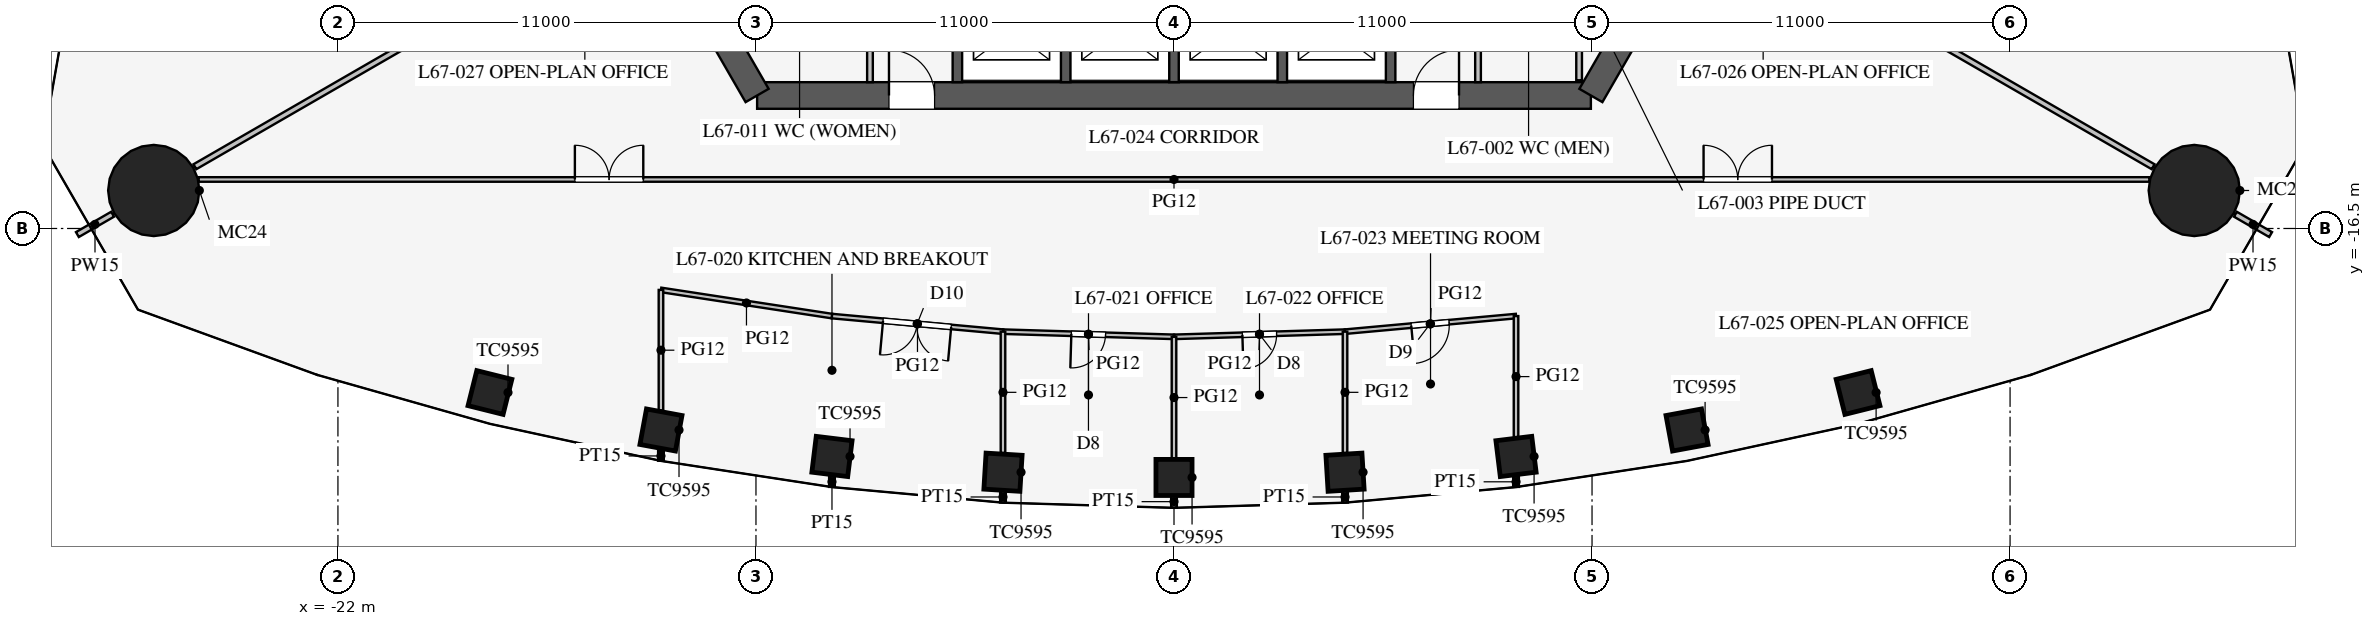
"""IFC4 building model, lengths in metres.
Left out: names, types, materials, properties, quantities, classifications, styles, units other than length and angle.
Written with IfcOpenShell. Run it as: python <this file> out.ifc"""

import sys

from ifc_helpers import new_model, si_unit, direction, frame, frame_2d, origin, origin_2d, place, context, subcontext, project, spatial, rectangle, circle, extrude, element, fill, save


model = new_model("IFC4")
c1 = context("Model", 3, precision=1e-05, world=origin(), true_north=direction((0.0, 1.0)))
c2 = subcontext(c1, "Body", "Model", "MODEL_VIEW")
j1 = project(units=[si_unit("LENGTHUNIT", "METRE"), si_unit("PLANEANGLEUNIT", "RADIAN")], contexts=[c1])
p1 = place(None, origin())
s1 = spatial("IfcSite", under=j1, at=p1, CompositionType="ELEMENT")
p2 = place(p1, origin())
s2 = spatial("IfcBuilding", under=s1, at=p2, CompositionType="ELEMENT")
p3 = place(p2, frame((0.0, 0.0, 293.1)))
s3 = spatial("IfcBuildingStorey", under=s2, at=p3, CompositionType="ELEMENT", Elevation=293.1)
for number, where, z_axis, x_axis in (
    (1, (-18.0, -20.816, 0.0), (0.0, 0.0, 1.0), (0.97, -0.242, 0.0)),
    (2, (-13.5, -21.803, 0.0), (0.0, 0.0, 1.0), (0.983, -0.182, 0.0)),
    (3, (-9.0, -22.499, 0.0), (0.0, 0.0, 1.0), (0.993, -0.121, 0.0)),
    (4, (-4.5, -22.914, 0.0), (0.0, 0.0, 1.0), (0.998, -0.061, 0.0)),
    (5, (0.0, -23.052, 0.0), (0.0, 0.0, 1.0), (1.0, 0.0, 0.0)),
    (6, (4.5, -22.914, 0.0), (0.0, 0.0, 1.0), (0.998, 0.061, 0.0)),
    (7, (9.0, -22.499, 0.0), (0.0, 0.0, 1.0), (0.993, 0.121, 0.0)),
    (8, (13.5, -21.803, 0.0), (0.0, 0.0, 1.0), (0.983, 0.182, 0.0)),
    (9, (18.0, -20.816, 0.0), (0.0, 0.0, 1.0), (0.97, 0.242, 0.0)),
):
    element("IfcColumn", number, at=place(p3, frame(where, z_axis=z_axis, x_axis=x_axis)), inside=s3, PredefinedType="COLUMN", context=c2, shape_type="SweptSolid", body=[
        extrude(rectangle(XDim=0.95, YDim=0.95, at=origin_2d()), origin(), (0.0, 0.0, 1.0), 4.2),
    ])
for number, where, z_axis, x_axis in (
    (10, (26.847, -15.5, 0.0), (0.0, 0.0, 1.0), (1.0, 0.0, 0.0)),
    (11, (-26.847, -15.5, 0.0), (0.0, 0.0, 1.0), (1.0, 0.0, 0.0)),
):
    element("IfcColumn", number, at=place(p3, frame(where, z_axis=z_axis, x_axis=x_axis)), inside=s3, PredefinedType="COLUMN", context=c2, shape_type="SweptSolid", body=[
        extrude(circle(Radius=1.2, at=origin_2d()), origin(), (0.0, 0.0, 1.0), 4.2),
    ])
p4 = place(p3, frame((-10.97, -13.0, 0.0), z_axis=(0.0, 0.0, 1.0), x_axis=(1.0, 0.0, 0.0)))
e12 = element("IfcWall", 12, at=p4, inside=s3, PredefinedType="SHEAR", context=c2, shape_type="SweptSolid", body=[
    extrude(rectangle(XDim=21.939, YDim=0.7, at=frame_2d((10.97, 0.0))), origin(), (0.0, 0.0, 1.0), 4.2),
])
p5 = place(p4, frame((17.27, 0.0, 0.0)))
e13 = element("IfcOpeningElement", 13, at=p5, cuts=e12, PredefinedType="OPENING", context=c2, shape_type="SweptSolid", body=[
    extrude(rectangle(XDim=1.2, YDim=2.1, at=frame_2d((0.6, 1.05))), frame((0.0, 0.36, 0.0), z_axis=(0.0, -1.0, 0.0), x_axis=(1.0, 0.0, 0.0)), (0.0, 0.0, 1.0), 0.72),
])
p6 = place(p4, frame((3.47, 0.0, 0.0)))
e14 = element("IfcOpeningElement", 14, at=p6, cuts=e12, PredefinedType="OPENING", context=c2, shape_type="SweptSolid", body=[
    extrude(rectangle(XDim=1.2, YDim=2.1, at=frame_2d((0.6, 1.05))), frame((0.0, 0.36, 0.0), z_axis=(0.0, -1.0, 0.0), x_axis=(1.0, 0.0, 0.0)), (0.0, 0.0, 1.0), 0.72),
])
for number, where, z_axis, x_axis in (
    (15, (10.97, -13.0, 0.0), (0.0, 0.0, 1.0), (0.5, 0.866, 0.0)),
    (16, (-16.743, -3.0, 0.0), (0.0, 0.0, 1.0), (0.5, -0.866, 0.0)),
):
    element("IfcWall", number, at=place(p3, frame(where, z_axis=z_axis, x_axis=x_axis)), inside=s3, PredefinedType="SHEAR", context=c2, shape_type="SweptSolid", body=[
        extrude(rectangle(XDim=11.547, YDim=0.7, at=frame_2d((5.773, 0.0))), origin(), (0.0, 0.0, 1.0), 4.2),
    ])
for number, where, z_axis, x_axis in (
    (17, (-5.7, -10.025, 0.0), (0.0, 0.0, 1.0), (0.0, -1.0, 0.0)),
    (18, (-2.85, -10.025, 0.0), (0.0, 0.0, 1.0), (0.0, -1.0, 0.0)),
    (19, (0.0, -10.025, 0.0), (0.0, 0.0, 1.0), (0.0, -1.0, 0.0)),
    (20, (2.85, -10.025, 0.0), (0.0, 0.0, 1.0), (0.0, -1.0, 0.0)),
    (21, (5.7, -10.025, 0.0), (0.0, 0.0, 1.0), (0.0, -1.0, 0.0)),
):
    element("IfcWall", number, at=place(p3, frame(where, z_axis=z_axis, x_axis=x_axis)), inside=s3, PredefinedType="SHEAR", context=c2, shape_type="SweptSolid", body=[
        extrude(rectangle(XDim=2.625, YDim=0.25, at=frame_2d((1.312, 0.0))), origin(), (0.0, 0.0, 1.0), 4.2),
    ])
p7 = place(p3, frame((8.0, -7.5, 0.0), z_axis=(0.0, 0.0, 1.0), x_axis=(0.0, -1.0, 0.0)))
e22 = element("IfcWall", 22, at=p7, inside=s3, PredefinedType="PARTITIONING", context=c2, shape_type="SweptSolid", body=[
    extrude(rectangle(XDim=5.15, YDim=0.15, at=frame_2d((2.575, 0.0))), origin(), (0.0, 0.0, 1.0), 4.0),
])
p8 = place(p7, frame((1.3, 0.0, 0.0)))
e23 = element("IfcOpeningElement", 23, at=p8, cuts=e22, PredefinedType="OPENING", context=c2, shape_type="SweptSolid", body=[
    extrude(rectangle(XDim=0.9, YDim=2.1, at=frame_2d((0.45, 1.05))), frame((0.0, 0.085, 0.0), z_axis=(0.0, -1.0, 0.0), x_axis=(1.0, 0.0, 0.0)), (0.0, 0.0, 1.0), 0.17),
])
p9 = place(p3, frame((-8.0, -7.5, 0.0), z_axis=(0.0, 0.0, 1.0), x_axis=(0.0, -1.0, 0.0)))
e24 = element("IfcWall", 24, at=p9, inside=s3, PredefinedType="PARTITIONING", context=c2, shape_type="SweptSolid", body=[
    extrude(rectangle(XDim=5.15, YDim=0.15, at=frame_2d((2.575, 0.0))), origin(), (0.0, 0.0, 1.0), 4.0),
])
p10 = place(p9, frame((2.6, 0.0, 0.0)))
e25 = element("IfcOpeningElement", 25, at=p10, cuts=e24, PredefinedType="OPENING", context=c2, shape_type="SweptSolid", body=[
    extrude(rectangle(XDim=0.9, YDim=2.1, at=frame_2d((0.45, 1.05))), frame((0.0, 0.085, 0.0), z_axis=(0.0, -1.0, 0.0), x_axis=(1.0, 0.0, 0.0)), (0.0, 0.0, 1.0), 0.17),
])
p11 = place(p3, frame((10.66, -8.5, 0.0), z_axis=(0.0, 0.0, 1.0), x_axis=(0.0, -1.0, 0.0)))
e26 = element("IfcWall", 26, at=p11, inside=s3, PredefinedType="PARTITIONING", context=c2, shape_type="SweptSolid", body=[
    extrude(rectangle(XDim=4.1, YDim=0.15, at=frame_2d((2.05, 0.0))), origin(), (0.0, 0.0, 1.0), 4.0),
])
p12 = place(p3, frame((14.159, -8.175, 0.0), z_axis=(0.0, 0.0, 1.0), x_axis=(0.866026905467, -0.499997399001, 0.0)))
e27 = element("IfcWall", 27, at=p12, inside=s3, PredefinedType="PARTITIONING", context=c2, shape_type="SweptSolid", body=[
    extrude(rectangle(XDim=13.4, YDim=0.15, at=frame_2d((6.7, 0.0))), origin(), (0.0, 0.0, 1.0), 2.5),
])
p13 = place(p3, frame((27.929, -16.125, 0.0), z_axis=(0.0, 0.0, 1.0), x_axis=(0.866086810508, -0.499893625349, 0.0)))
e28 = element("IfcWall", 28, at=p13, inside=s3, PredefinedType="PARTITIONING", context=c2, shape_type="SweptSolid", body=[
    extrude(rectangle(XDim=1.07, YDim=0.15, at=frame_2d((0.535, 0.0))), origin(), (0.0, 0.0, 1.0), 2.5),
])
p14 = place(p3, frame((-14.159, -8.175, 0.0), z_axis=(0.0, 0.0, 1.0), x_axis=(-0.866026905467, -0.499997399001, 0.0)))
e29 = element("IfcWall", 29, at=p14, inside=s3, PredefinedType="PARTITIONING", context=c2, shape_type="SweptSolid", body=[
    extrude(rectangle(XDim=13.4, YDim=0.15, at=frame_2d((6.7, 0.0))), origin(), (0.0, 0.0, 1.0), 2.5),
])
p15 = place(p3, frame((-27.929, -16.125, 0.0), z_axis=(0.0, 0.0, 1.0), x_axis=(-0.866086810508, -0.499893625349, 0.0)))
e30 = element("IfcWall", 30, at=p15, inside=s3, PredefinedType="PARTITIONING", context=c2, shape_type="SweptSolid", body=[
    extrude(rectangle(XDim=1.07, YDim=0.15, at=frame_2d((0.535, 0.0))), origin(), (0.0, 0.0, 1.0), 2.5),
])
p16 = place(p3, frame((-25.665, -15.21, 0.0), z_axis=(0.0, 0.0, 1.0), x_axis=(1.0, 0.0, 0.0)))
e31 = element("IfcWall", 31, at=p16, inside=s3, PredefinedType="PARTITIONING", context=c2, shape_type="SweptSolid", body=[
    extrude(rectangle(XDim=51.33, YDim=0.12, at=frame_2d((25.665, 0.0))), origin(), (0.0, 0.0, 1.0), 2.9),
])
p17 = place(p16, frame((9.9, 0.0, 0.15)))
e32 = element("IfcOpeningElement", 32, at=p17, cuts=e31, PredefinedType="OPENING", context=c2, shape_type="SweptSolid", body=[
    extrude(rectangle(XDim=1.8, YDim=2.1, at=frame_2d((0.9, 1.05))), frame((0.0, 0.07, 0.0), z_axis=(0.0, -1.0, 0.0), x_axis=(1.0, 0.0, 0.0)), (0.0, 0.0, 1.0), 0.14),
])
p18 = place(p16, frame((39.6, 0.0, 0.15)))
e33 = element("IfcOpeningElement", 33, at=p18, cuts=e31, PredefinedType="OPENING", context=c2, shape_type="SweptSolid", body=[
    extrude(rectangle(XDim=1.8, YDim=2.1, at=frame_2d((0.9, 1.05))), frame((0.0, 0.07, 0.0), z_axis=(0.0, -1.0, 0.0), x_axis=(1.0, 0.0, 0.0)), (0.0, 0.0, 1.0), 0.14),
])
p19 = place(p3, frame((4.5, -23.421, 0.0), z_axis=(0.0, 0.0, 1.0), x_axis=(0.0, -1.0, 0.0)))
e34 = element("IfcWall", 34, at=p19, inside=s3, PredefinedType="PARTITIONING", context=c2, shape_type="SweptSolid", body=[
    extrude(rectangle(XDim=0.29, YDim=0.15, at=frame_2d((0.145, 0.0))), origin(), (0.0, 0.0, 1.0), 2.9),
])
p20 = place(p3, frame((9.0, -23.032, 0.0), z_axis=(0.0, 0.0, 1.0), x_axis=(0.0, -1.0, 0.0)))
e35 = element("IfcWall", 35, at=p20, inside=s3, PredefinedType="PARTITIONING", context=c2, shape_type="SweptSolid", body=[
    extrude(rectangle(XDim=0.268, YDim=0.15, at=frame_2d((0.134, 0.0))), origin(), (0.0, 0.0, 1.0), 2.9),
])
p21 = place(p3, frame((0.0, -23.531, 0.0), z_axis=(0.0, 0.0, 1.0), x_axis=(0.0, -1.0, 0.0)))
e36 = element("IfcWall", 36, at=p21, inside=s3, PredefinedType="PARTITIONING", context=c2, shape_type="SweptSolid", body=[
    extrude(rectangle(XDim=0.316, YDim=0.15, at=frame_2d((0.158, 0.0))), origin(), (0.0, 0.0, 1.0), 2.9),
])
p22 = place(p3, frame((-13.5, -22.36, 0.0), z_axis=(0.0, 0.0, 1.0), x_axis=(0.0, -1.0, 0.0)))
e37 = element("IfcWall", 37, at=p22, inside=s3, PredefinedType="PARTITIONING", context=c2, shape_type="SweptSolid", body=[
    extrude(rectangle(XDim=0.251, YDim=0.15, at=frame_2d((0.125, 0.0))), origin(), (0.0, 0.0, 1.0), 2.9),
])
p23 = place(p3, frame((-4.5, -23.421, 0.0), z_axis=(0.0, 0.0, 1.0), x_axis=(0.0, -1.0, 0.0)))
e38 = element("IfcWall", 38, at=p23, inside=s3, PredefinedType="PARTITIONING", context=c2, shape_type="SweptSolid", body=[
    extrude(rectangle(XDim=0.29, YDim=0.15, at=frame_2d((0.145, 0.0))), origin(), (0.0, 0.0, 1.0), 2.9),
])
p24 = place(p3, frame((-9.0, -23.032, 0.0), z_axis=(0.0, 0.0, 1.0), x_axis=(0.0, -1.0, 0.0)))
e39 = element("IfcWall", 39, at=p24, inside=s3, PredefinedType="PARTITIONING", context=c2, shape_type="SweptSolid", body=[
    extrude(rectangle(XDim=0.268, YDim=0.15, at=frame_2d((0.134, 0.0))), origin(), (0.0, 0.0, 1.0), 2.9),
])
p25 = place(p3, frame((0.0, -19.352, 0.0), z_axis=(0.0, 0.0, 1.0), x_axis=(0.999542074227, 0.030259574513, 0.0)))
e40 = element("IfcWall", 40, at=p25, inside=s3, PredefinedType="PARTITIONING", context=c2, shape_type="SweptSolid", body=[
    extrude(rectangle(XDim=4.502, YDim=0.12, at=frame_2d((2.251, 0.0))), origin(), (0.0, 0.0, 1.0), 2.9),
])
p26 = place(p25, frame((1.8, 0.0, 0.15)))
e41 = element("IfcOpeningElement", 41, at=p26, cuts=e40, PredefinedType="OPENING", context=c2, shape_type="SweptSolid", body=[
    extrude(rectangle(XDim=0.9, YDim=2.1, at=frame_2d((0.45, 1.05))), frame((0.0, 0.07, 0.0), z_axis=(0.0, -1.0, 0.0), x_axis=(1.0, 0.0, 0.0)), (0.0, 0.0, 1.0), 0.14),
])
p27 = place(p3, frame((4.5, -19.215, 0.0), z_axis=(0.0, 0.0, 1.0), x_axis=(0.995871921504, 0.090769576179, 0.0)))
e42 = element("IfcWall", 42, at=p27, inside=s3, PredefinedType="PARTITIONING", context=c2, shape_type="SweptSolid", body=[
    extrude(rectangle(XDim=4.519, YDim=0.12, at=frame_2d((2.259, 0.0))), origin(), (0.0, 0.0, 1.0), 2.9),
])
p28 = place(p27, frame((1.75, 0.0, 0.15)))
e43 = element("IfcOpeningElement", 43, at=p28, cuts=e42, PredefinedType="OPENING", context=c2, shape_type="SweptSolid", body=[
    extrude(rectangle(XDim=1.0, YDim=2.1, at=frame_2d((0.5, 1.05))), frame((0.0, 0.07, 0.0), z_axis=(0.0, -1.0, 0.0), x_axis=(1.0, 0.0, 0.0)), (0.0, 0.0, 1.0), 0.14),
])
p29 = place(p3, frame((-13.5, -18.116, 0.0), z_axis=(0.0, 0.0, 1.0), x_axis=(0.988481794406, -0.151339823341, 0.0)))
e44 = element("IfcWall", 44, at=p29, inside=s3, PredefinedType="PARTITIONING", context=c2, shape_type="SweptSolid", body=[
    extrude(rectangle(XDim=4.552, YDim=0.12, at=frame_2d((2.276, 0.0))), origin(), (0.0, 0.0, 1.0), 2.9),
])
p30 = place(p3, frame((-4.5, -19.215, 0.0), z_axis=(0.0, 0.0, 1.0), x_axis=(0.999542074227, -0.030259574513, 0.0)))
e45 = element("IfcWall", 45, at=p30, inside=s3, PredefinedType="PARTITIONING", context=c2, shape_type="SweptSolid", body=[
    extrude(rectangle(XDim=4.502, YDim=0.12, at=frame_2d((2.251, 0.0))), origin(), (0.0, 0.0, 1.0), 2.9),
])
p31 = place(p30, frame((1.8, 0.0, 0.15)))
e46 = element("IfcOpeningElement", 46, at=p31, cuts=e45, PredefinedType="OPENING", context=c2, shape_type="SweptSolid", body=[
    extrude(rectangle(XDim=0.9, YDim=2.1, at=frame_2d((0.45, 1.05))), frame((0.0, 0.07, 0.0), z_axis=(0.0, -1.0, 0.0), x_axis=(1.0, 0.0, 0.0)), (0.0, 0.0, 1.0), 0.14),
])
p32 = place(p3, frame((-9.0, -18.805, 0.0), z_axis=(0.0, 0.0, 1.0), x_axis=(0.995871921504, -0.090769576179, 0.0)))
e47 = element("IfcWall", 47, at=p32, inside=s3, PredefinedType="PARTITIONING", context=c2, shape_type="SweptSolid", body=[
    extrude(rectangle(XDim=4.519, YDim=0.12, at=frame_2d((2.259, 0.0))), origin(), (0.0, 0.0, 1.0), 2.9),
])
p33 = place(p32, frame((1.35, 0.0, 0.15)))
e48 = element("IfcOpeningElement", 48, at=p33, cuts=e47, PredefinedType="OPENING", context=c2, shape_type="SweptSolid", body=[
    extrude(rectangle(XDim=1.8, YDim=2.1, at=frame_2d((0.9, 1.05))), frame((0.0, 0.07, 0.0), z_axis=(0.0, -1.0, 0.0), x_axis=(1.0, 0.0, 0.0)), (0.0, 0.0, 1.0), 0.14),
])
p34 = place(p3, frame((0.0, -19.352, 0.0), z_axis=(0.0, 0.0, 1.0), x_axis=(0.0, -1.0, 0.0)))
e49 = element("IfcWall", 49, at=p34, inside=s3, PredefinedType="PARTITIONING", context=c2, shape_type="SweptSolid", body=[
    extrude(rectangle(XDim=3.195, YDim=0.12, at=frame_2d((1.598, 0.0))), origin(), (0.0, 0.0, 1.0), 2.9),
])
p35 = place(p3, frame((4.5, -19.215, 0.0), z_axis=(0.0, 0.0, 1.0), x_axis=(0.0, -1.0, 0.0)))
e50 = element("IfcWall", 50, at=p35, inside=s3, PredefinedType="PARTITIONING", context=c2, shape_type="SweptSolid", body=[
    extrude(rectangle(XDim=3.193, YDim=0.12, at=frame_2d((1.596, 0.0))), origin(), (0.0, 0.0, 1.0), 2.9),
])
p36 = place(p3, frame((9.0, -18.805, 0.0), z_axis=(0.0, 0.0, 1.0), x_axis=(0.0, -1.0, 0.0)))
e51 = element("IfcWall", 51, at=p36, inside=s3, PredefinedType="PARTITIONING", context=c2, shape_type="SweptSolid", body=[
    extrude(rectangle(XDim=3.185, YDim=0.12, at=frame_2d((1.593, 0.0))), origin(), (0.0, 0.0, 1.0), 2.9),
])
p37 = place(p3, frame((-13.5, -18.116, 0.0), z_axis=(0.0, 0.0, 1.0), x_axis=(0.0, -1.0, 0.0)))
e52 = element("IfcWall", 52, at=p37, inside=s3, PredefinedType="PARTITIONING", context=c2, shape_type="SweptSolid", body=[
    extrude(rectangle(XDim=3.173, YDim=0.12, at=frame_2d((1.586, 0.0))), origin(), (0.0, 0.0, 1.0), 2.9),
])
p38 = place(p3, frame((-4.5, -19.215, 0.0), z_axis=(0.0, 0.0, 1.0), x_axis=(0.0, -1.0, 0.0)))
e53 = element("IfcWall", 53, at=p38, inside=s3, PredefinedType="PARTITIONING", context=c2, shape_type="SweptSolid", body=[
    extrude(rectangle(XDim=3.193, YDim=0.12, at=frame_2d((1.596, 0.0))), origin(), (0.0, 0.0, 1.0), 2.9),
])
p39 = place(p5, origin())
e54 = element("IfcDoor", 54, at=p39, inside=s3, OperationType="SINGLE_SWING_RIGHT", PredefinedType="DOOR", context=c2, shape_type="SweptSolid", body=[
    extrude(rectangle(XDim=1.2, YDim=2.1, at=frame_2d((0.6, 1.05))), frame((0.0, 0.025, 0.0), z_axis=(0.0, -1.0, 0.0), x_axis=(1.0, 0.0, 0.0)), (0.0, 0.0, 1.0), 0.05),
])
fill(e13, e54)
p40 = place(p6, origin())
e55 = element("IfcDoor", 55, at=p40, inside=s3, OperationType="SINGLE_SWING_LEFT", PredefinedType="DOOR", context=c2, shape_type="SweptSolid", body=[
    extrude(rectangle(XDim=1.2, YDim=2.1, at=frame_2d((0.6, 1.05))), frame((0.0, 0.025, 0.0), z_axis=(0.0, -1.0, 0.0), x_axis=(1.0, 0.0, 0.0)), (0.0, 0.0, 1.0), 0.05),
])
fill(e14, e55)
p41 = place(p33, frame((1.8, 0.0, 0.0), z_axis=(0.0, 0.0, 1.0), x_axis=(-1.0, 0.0, 0.0)))
e56 = element("IfcDoor", 56, at=p41, inside=s3, OperationType="DOUBLE_DOOR_SINGLE_SWING", PredefinedType="DOOR", context=c2, shape_type="SweptSolid", body=[
    extrude(rectangle(XDim=1.8, YDim=2.1, at=frame_2d((0.9, 1.05))), frame((0.0, 0.025, 0.0), z_axis=(0.0, -1.0, 0.0), x_axis=(1.0, 0.0, 0.0)), (0.0, 0.0, 1.0), 0.05),
])
fill(e48, e56)
p42 = place(p31, frame((0.9, 0.0, 0.0), z_axis=(0.0, 0.0, 1.0), x_axis=(-1.0, 0.0, 0.0)))
e57 = element("IfcDoor", 57, at=p42, inside=s3, OperationType="SINGLE_SWING_RIGHT", PredefinedType="DOOR", context=c2, shape_type="SweptSolid", body=[
    extrude(rectangle(XDim=0.9, YDim=2.1, at=frame_2d((0.45, 1.05))), frame((0.0, 0.025, 0.0), z_axis=(0.0, -1.0, 0.0), x_axis=(1.0, 0.0, 0.0)), (0.0, 0.0, 1.0), 0.05),
])
fill(e46, e57)
p43 = place(p26, frame((0.9, 0.0, 0.0), z_axis=(0.0, 0.0, 1.0), x_axis=(-1.0, 0.0, 0.0)))
e58 = element("IfcDoor", 58, at=p43, inside=s3, OperationType="SINGLE_SWING_RIGHT", PredefinedType="DOOR", context=c2, shape_type="SweptSolid", body=[
    extrude(rectangle(XDim=0.9, YDim=2.1, at=frame_2d((0.45, 1.05))), frame((0.0, 0.025, 0.0), z_axis=(0.0, -1.0, 0.0), x_axis=(1.0, 0.0, 0.0)), (0.0, 0.0, 1.0), 0.05),
])
fill(e41, e58)
p44 = place(p28, frame((1.0, 0.0, 0.0), z_axis=(0.0, 0.0, 1.0), x_axis=(-1.0, 0.0, 0.0)))
e59 = element("IfcDoor", 59, at=p44, inside=s3, OperationType="SINGLE_SWING_RIGHT", PredefinedType="DOOR", context=c2, shape_type="SweptSolid", body=[
    extrude(rectangle(XDim=1.0, YDim=2.1, at=frame_2d((0.5, 1.05))), frame((0.0, 0.025, 0.0), z_axis=(0.0, -1.0, 0.0), x_axis=(1.0, 0.0, 0.0)), (0.0, 0.0, 1.0), 0.05),
])
fill(e43, e59)
p45 = place(p17, origin())
e60 = element("IfcDoor", 60, at=p45, inside=s3, OperationType="DOUBLE_DOOR_SINGLE_SWING", PredefinedType="DOOR", context=c2, shape_type="SweptSolid", body=[
    extrude(rectangle(XDim=1.8, YDim=2.1, at=frame_2d((0.9, 1.05))), frame((0.0, 0.025, 0.0), z_axis=(0.0, -1.0, 0.0), x_axis=(1.0, 0.0, 0.0)), (0.0, 0.0, 1.0), 0.05),
])
fill(e32, e60)
p46 = place(p18, origin())
e61 = element("IfcDoor", 61, at=p46, inside=s3, OperationType="DOUBLE_DOOR_SINGLE_SWING", PredefinedType="DOOR", context=c2, shape_type="SweptSolid", body=[
    extrude(rectangle(XDim=1.8, YDim=2.1, at=frame_2d((0.9, 1.05))), frame((0.0, 0.025, 0.0), z_axis=(0.0, -1.0, 0.0), x_axis=(1.0, 0.0, 0.0)), (0.0, 0.0, 1.0), 0.05),
])
fill(e33, e61)
save(model, sys.argv[1])
